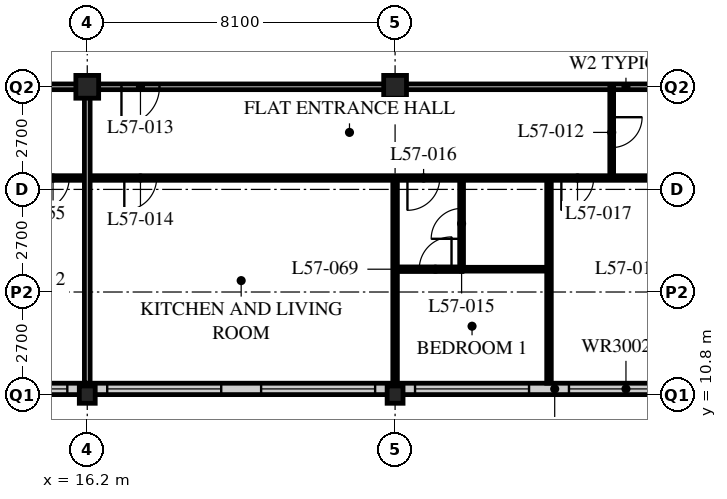
"""IFC4 building model, lengths in metres.
Left out: names, types, materials, properties, quantities, classifications, styles, units other than length and angle.
Written with IfcOpenShell. Run it as: python <this file> out.ifc"""

import sys

from ifc_helpers import new_model, si_unit, direction, frame, frame_2d, origin, origin_2d, place, context, subcontext, project, spatial, rectangle, hollow_rectangle, i_section, extrude, element, fill, save


model = new_model("IFC4")
c1 = context("Model", 3, precision=1e-05, world=origin(), true_north=direction((0.0, 1.0)))
c2 = subcontext(c1, "Body", "Model", "MODEL_VIEW")
j1 = project(units=[si_unit("LENGTHUNIT", "METRE"), si_unit("PLANEANGLEUNIT", "RADIAN")], contexts=[c1])
p1 = place(None, origin())
s1 = spatial("IfcSite", under=j1, at=p1, CompositionType="ELEMENT")
p2 = place(p1, origin())
s2 = spatial("IfcBuilding", under=s1, at=p2, CompositionType="ELEMENT")
p3 = place(p2, frame((0.0, 0.0, 220.8)))
s3 = spatial("IfcBuildingStorey", under=s2, at=p3, CompositionType="ELEMENT", Elevation=220.8)
p4 = place(p3, frame((16.2, 10.8, 0.0), z_axis=(0.0, 0.0, 1.0), x_axis=(1.0, 0.0, 0.0)))
e1 = element("IfcColumn", 1, at=p4, inside=s3, PredefinedType="COLUMN", context=c2, shape_type="SweptSolid", body=[
    extrude(i_section(OverallWidth=0.418, OverallDepth=0.456, WebThickness=0.042, FlangeThickness=0.067, FilletRadius=0.015, at=origin_2d()), origin(), (0.0, 0.0, 1.0), 3.6),
])
p5 = place(p3, frame((16.2, 18.9, 0.0), z_axis=(0.0, 0.0, 1.0), x_axis=(1.0, 0.0, 0.0)))
e2 = element("IfcColumn", 2, at=p5, inside=s3, PredefinedType="COLUMN", context=c2, shape_type="SweptSolid", body=[
    extrude(hollow_rectangle(XDim=0.6, YDim=0.6, WallThickness=0.05, at=origin_2d()), origin(), (0.0, 0.0, 1.0), 3.6),
])
p6 = place(p3, frame((24.3, 10.8, 0.0), z_axis=(0.0, 0.0, 1.0), x_axis=(1.0, 0.0, 0.0)))
e3 = element("IfcColumn", 3, at=p6, inside=s3, PredefinedType="COLUMN", context=c2, shape_type="SweptSolid", body=[
    extrude(i_section(OverallWidth=0.418, OverallDepth=0.456, WebThickness=0.042, FlangeThickness=0.067, FilletRadius=0.015, at=origin_2d()), origin(), (0.0, 0.0, 1.0), 3.6),
])
p7 = place(p3, frame((24.3, 18.9, 0.0), z_axis=(0.0, 0.0, 1.0), x_axis=(1.0, 0.0, 0.0)))
e4 = element("IfcColumn", 4, at=p7, inside=s3, PredefinedType="COLUMN", context=c2, shape_type="SweptSolid", body=[
    extrude(hollow_rectangle(XDim=0.6, YDim=0.6, WallThickness=0.05, at=origin_2d()), origin(), (0.0, 0.0, 1.0), 3.6),
])
p8 = place(p3, frame((8.4, 10.95, 0.0), z_axis=(0.0, 0.0, 1.0), x_axis=(1.0, 0.0, 0.0)))
e5 = element("IfcWall", 5, at=p8, inside=s3, PredefinedType="SOLIDWALL", context=c2, shape_type="SweptSolid", body=[
    extrude(rectangle(XDim=40.2, YDim=0.3, at=frame_2d((20.1, 0.0))), origin(), (0.0, 0.0, 1.0), 3.39),
])
p9 = place(p8, frame((0.225, 0.0, 0.6)))
e6 = element("IfcOpeningElement", 6, at=p9, cuts=e5, PredefinedType="OPENING", context=c2, shape_type="SweptSolid", body=[
    extrude(rectangle(XDim=3.0, YDim=2.0, at=frame_2d((1.5, 1.0))), frame((0.0, 0.16, 0.0), z_axis=(0.0, -1.0, 0.0), x_axis=(1.0, 0.0, 0.0)), (0.0, 0.0, 1.0), 0.32),
])
p10 = place(p8, frame((4.275, 0.0, 0.6)))
e7 = element("IfcOpeningElement", 7, at=p10, cuts=e5, PredefinedType="OPENING", context=c2, shape_type="SweptSolid", body=[
    extrude(rectangle(XDim=3.0, YDim=2.0, at=frame_2d((1.5, 1.0))), frame((0.0, 0.16, 0.0), z_axis=(0.0, -1.0, 0.0), x_axis=(1.0, 0.0, 0.0)), (0.0, 0.0, 1.0), 0.32),
])
p11 = place(p8, frame((8.325, 0.0, 0.6)))
e8 = element("IfcOpeningElement", 8, at=p11, cuts=e5, PredefinedType="OPENING", context=c2, shape_type="SweptSolid", body=[
    extrude(rectangle(XDim=3.0, YDim=2.0, at=frame_2d((1.5, 1.0))), frame((0.0, 0.16, 0.0), z_axis=(0.0, -1.0, 0.0), x_axis=(1.0, 0.0, 0.0)), (0.0, 0.0, 1.0), 0.32),
])
p12 = place(p8, frame((12.375, 0.0, 0.6)))
e9 = element("IfcOpeningElement", 9, at=p12, cuts=e5, PredefinedType="OPENING", context=c2, shape_type="SweptSolid", body=[
    extrude(rectangle(XDim=3.0, YDim=2.0, at=frame_2d((1.5, 1.0))), frame((0.0, 0.16, 0.0), z_axis=(0.0, -1.0, 0.0), x_axis=(1.0, 0.0, 0.0)), (0.0, 0.0, 1.0), 0.32),
])
p13 = place(p8, frame((16.425, 0.0, 0.6)))
e10 = element("IfcOpeningElement", 10, at=p13, cuts=e5, PredefinedType="OPENING", context=c2, shape_type="SweptSolid", body=[
    extrude(rectangle(XDim=3.0, YDim=2.0, at=frame_2d((1.5, 1.0))), frame((0.0, 0.16, 0.0), z_axis=(0.0, -1.0, 0.0), x_axis=(1.0, 0.0, 0.0)), (0.0, 0.0, 1.0), 0.32),
])
p14 = place(p8, frame((20.475, 0.0, 0.6)))
e11 = element("IfcOpeningElement", 11, at=p14, cuts=e5, PredefinedType="OPENING", context=c2, shape_type="SweptSolid", body=[
    extrude(rectangle(XDim=3.0, YDim=2.0, at=frame_2d((1.5, 1.0))), frame((0.0, 0.16, 0.0), z_axis=(0.0, -1.0, 0.0), x_axis=(1.0, 0.0, 0.0)), (0.0, 0.0, 1.0), 0.32),
])
p15 = place(p8, frame((24.525, 0.0, 0.6)))
e12 = element("IfcOpeningElement", 12, at=p15, cuts=e5, PredefinedType="OPENING", context=c2, shape_type="SweptSolid", body=[
    extrude(rectangle(XDim=3.0, YDim=2.0, at=frame_2d((1.5, 1.0))), frame((0.0, 0.16, 0.0), z_axis=(0.0, -1.0, 0.0), x_axis=(1.0, 0.0, 0.0)), (0.0, 0.0, 1.0), 0.32),
])
p16 = place(p8, frame((28.575, 0.0, 0.6)))
e13 = element("IfcOpeningElement", 13, at=p16, cuts=e5, PredefinedType="OPENING", context=c2, shape_type="SweptSolid", body=[
    extrude(rectangle(XDim=3.0, YDim=2.0, at=frame_2d((1.5, 1.0))), frame((0.0, 0.16, 0.0), z_axis=(0.0, -1.0, 0.0), x_axis=(1.0, 0.0, 0.0)), (0.0, 0.0, 1.0), 0.32),
])
p17 = place(p8, frame((32.625, 0.0, 0.6)))
e14 = element("IfcOpeningElement", 14, at=p17, cuts=e5, PredefinedType="OPENING", context=c2, shape_type="SweptSolid", body=[
    extrude(rectangle(XDim=3.0, YDim=2.0, at=frame_2d((1.5, 1.0))), frame((0.0, 0.16, 0.0), z_axis=(0.0, -1.0, 0.0), x_axis=(1.0, 0.0, 0.0)), (0.0, 0.0, 1.0), 0.32),
])
p18 = place(p8, frame((36.675, 0.0, 0.6)))
e15 = element("IfcOpeningElement", 15, at=p18, cuts=e5, PredefinedType="OPENING", context=c2, shape_type="SweptSolid", body=[
    extrude(rectangle(XDim=3.0, YDim=2.0, at=frame_2d((1.5, 1.0))), frame((0.0, 0.16, 0.0), z_axis=(0.0, -1.0, 0.0), x_axis=(1.0, 0.0, 0.0)), (0.0, 0.0, 1.0), 0.32),
])
p19 = place(p3, frame((12.15, 18.9, 0.0), z_axis=(0.0, 0.0, 1.0), x_axis=(1.0, 0.0, 0.0)))
e16 = element("IfcWall", 16, at=p19, inside=s3, PredefinedType="PARTITIONING", context=c2, shape_type="SweptSolid", body=[
    extrude(rectangle(XDim=36.45, YDim=0.15, at=frame_2d((18.225, 0.0))), origin(), (0.0, 0.0, 1.0), 2.628),
])
p20 = place(p19, frame((4.95, 0.0, 0.0)))
e17 = element("IfcOpeningElement", 17, at=p20, cuts=e16, PredefinedType="OPENING", context=c2, shape_type="SweptSolid", body=[
    extrude(rectangle(XDim=1.0, YDim=2.1, at=frame_2d((0.5, 1.05))), frame((0.0, 0.085, 0.0), z_axis=(0.0, -1.0, 0.0), x_axis=(1.0, 0.0, 0.0)), (0.0, 0.0, 1.0), 0.17),
])
p21 = place(p19, frame((22.6, 0.0, 0.0)))
e18 = element("IfcOpeningElement", 18, at=p21, cuts=e16, PredefinedType="OPENING", context=c2, shape_type="SweptSolid", body=[
    extrude(rectangle(XDim=1.0, YDim=2.1, at=frame_2d((0.5, 1.05))), frame((0.0, 0.085, 0.0), z_axis=(0.0, -1.0, 0.0), x_axis=(1.0, 0.0, 0.0)), (0.0, 0.0, 1.0), 0.17),
])
p22 = place(p19, frame((25.0, 0.0, 0.0)))
e19 = element("IfcOpeningElement", 19, at=p22, cuts=e16, PredefinedType="OPENING", context=c2, shape_type="SweptSolid", body=[
    extrude(rectangle(XDim=1.0, YDim=2.1, at=frame_2d((0.5, 1.05))), frame((0.0, 0.085, 0.0), z_axis=(0.0, -1.0, 0.0), x_axis=(1.0, 0.0, 0.0)), (0.0, 0.0, 1.0), 0.17),
])
p23 = place(p19, frame((30.7, 0.0, 0.0)))
e20 = element("IfcOpeningElement", 20, at=p23, cuts=e16, PredefinedType="OPENING", context=c2, shape_type="SweptSolid", body=[
    extrude(rectangle(XDim=1.0, YDim=2.1, at=frame_2d((0.5, 1.05))), frame((0.0, 0.085, 0.0), z_axis=(0.0, -1.0, 0.0), x_axis=(1.0, 0.0, 0.0)), (0.0, 0.0, 1.0), 0.17),
])
p24 = place(p19, frame((1.525, 0.0, 0.0)))
e21 = element("IfcOpeningElement", 21, at=p24, cuts=e16, PredefinedType="OPENING", context=c2, shape_type="SweptSolid", body=[
    extrude(rectangle(XDim=1.0, YDim=2.1, at=frame_2d((0.5, 1.05))), frame((0.0, 0.085, 0.0), z_axis=(0.0, -1.0, 0.0), x_axis=(1.0, 0.0, 0.0)), (0.0, 0.0, 1.0), 0.17),
])
p25 = place(p19, frame((32.825, 0.0, 0.0)))
e22 = element("IfcOpeningElement", 22, at=p25, cuts=e16, PredefinedType="OPENING", context=c2, shape_type="SweptSolid", body=[
    extrude(rectangle(XDim=1.0, YDim=2.1, at=frame_2d((0.5, 1.05))), frame((0.0, 0.085, 0.0), z_axis=(0.0, -1.0, 0.0), x_axis=(1.0, 0.0, 0.0)), (0.0, 0.0, 1.0), 0.17),
])
p26 = place(p3, frame((30.0, 18.9, 0.0), z_axis=(0.0, 0.0, 1.0), x_axis=(0.0, -1.0, 0.0)))
e23 = element("IfcWall", 23, at=p26, inside=s3, PredefinedType="PARTITIONING", context=c2, shape_type="SweptSolid", body=[
    extrude(rectangle(XDim=2.4, YDim=0.1, at=frame_2d((1.2, 0.0))), origin(), (0.0, 0.0, 1.0), 3.39),
])
p27 = place(p26, frame((0.8, 0.0, 0.0)))
e24 = element("IfcOpeningElement", 24, at=p27, cuts=e23, PredefinedType="OPENING", context=c2, shape_type="SweptSolid", body=[
    extrude(rectangle(XDim=0.8, YDim=2.1, at=frame_2d((0.4, 1.05))), frame((0.0, 0.06, 0.0), z_axis=(0.0, -1.0, 0.0), x_axis=(1.0, 0.0, 0.0)), (0.0, 0.0, 1.0), 0.12),
])
p28 = place(p3, frame((26.05, 16.5, 0.0), z_axis=(0.0, 0.0, 1.0), x_axis=(0.0, -1.0, 0.0)))
e25 = element("IfcWall", 25, at=p28, inside=s3, PredefinedType="PARTITIONING", context=c2, shape_type="SweptSolid", body=[
    extrude(rectangle(XDim=2.4, YDim=0.1, at=frame_2d((1.2, 0.0))), origin(), (0.0, 0.0, 1.0), 3.39),
])
p29 = place(p28, frame((0.8, 0.0, 0.0)))
e26 = element("IfcOpeningElement", 26, at=p29, cuts=e25, PredefinedType="OPENING", context=c2, shape_type="SweptSolid", body=[
    extrude(rectangle(XDim=0.8, YDim=2.1, at=frame_2d((0.4, 1.05))), frame((0.0, 0.06, 0.0), z_axis=(0.0, -1.0, 0.0), x_axis=(1.0, 0.0, 0.0)), (0.0, 0.0, 1.0), 0.12),
])
p30 = place(p3, frame((26.05, 14.1, 0.0), z_axis=(0.0, 0.0, 1.0), x_axis=(1.0, 0.0, 0.0)))
e27 = element("IfcWall", 27, at=p30, inside=s3, PredefinedType="PARTITIONING", context=c2, shape_type="SweptSolid", body=[
    extrude(rectangle(XDim=2.3, YDim=0.1, at=frame_2d((1.15, 0.0))), origin(), (0.0, 0.0, 1.0), 3.39),
])
p31 = place(p3, frame((24.3, 16.5, 0.0), z_axis=(0.0, 0.0, 1.0), x_axis=(0.0, -1.0, 0.0)))
e28 = element("IfcWall", 28, at=p31, inside=s3, PredefinedType="PARTITIONING", context=c2, shape_type="SweptSolid", body=[
    extrude(rectangle(XDim=5.4, YDim=0.12, at=frame_2d((2.7, 0.0))), origin(), (0.0, 0.0, 1.0), 2.628),
])
p32 = place(p3, frame((28.35, 16.5, 0.0), z_axis=(0.0, 0.0, 1.0), x_axis=(0.0, -1.0, 0.0)))
e29 = element("IfcWall", 29, at=p32, inside=s3, PredefinedType="PARTITIONING", context=c2, shape_type="SweptSolid", body=[
    extrude(rectangle(XDim=5.4, YDim=0.12, at=frame_2d((2.7, 0.0))), origin(), (0.0, 0.0, 1.0), 3.39),
])
p33 = place(p3, frame((8.15, 16.5, 0.0), z_axis=(0.0, 0.0, 1.0), x_axis=(1.0, 0.0, 0.0)))
e30 = element("IfcWall", 30, at=p33, inside=s3, PredefinedType="PARTITIONING", context=c2, shape_type="SweptSolid", body=[
    extrude(rectangle(XDim=24.25, YDim=0.12, at=frame_2d((12.125, 0.0))), origin(), (0.0, 0.0, 1.0), 3.39),
])
p34 = place(p33, frame((9.025, 0.0, 0.0)))
e31 = element("IfcOpeningElement", 31, at=p34, cuts=e30, PredefinedType="OPENING", context=c2, shape_type="SweptSolid", body=[
    extrude(rectangle(XDim=0.85, YDim=2.1, at=frame_2d((0.425, 1.05))), frame((0.0, 0.07, 0.0), z_axis=(0.0, -1.0, 0.0), x_axis=(1.0, 0.0, 0.0)), (0.0, 0.0, 1.0), 0.14),
])
p35 = place(p33, frame((16.475, 0.0, 0.0)))
e32 = element("IfcOpeningElement", 32, at=p35, cuts=e30, PredefinedType="OPENING", context=c2, shape_type="SweptSolid", body=[
    extrude(rectangle(XDim=0.85, YDim=2.1, at=frame_2d((0.425, 1.05))), frame((0.0, 0.07, 0.0), z_axis=(0.0, -1.0, 0.0), x_axis=(1.0, 0.0, 0.0)), (0.0, 0.0, 1.0), 0.14),
])
p36 = place(p33, frame((20.525, 0.0, 0.0)))
e33 = element("IfcOpeningElement", 33, at=p36, cuts=e30, PredefinedType="OPENING", context=c2, shape_type="SweptSolid", body=[
    extrude(rectangle(XDim=0.85, YDim=2.1, at=frame_2d((0.425, 1.05))), frame((0.0, 0.07, 0.0), z_axis=(0.0, -1.0, 0.0), x_axis=(1.0, 0.0, 0.0)), (0.0, 0.0, 1.0), 0.14),
])
p37 = place(p33, frame((6.725, 0.0, 0.0)))
e34 = element("IfcOpeningElement", 34, at=p37, cuts=e30, PredefinedType="OPENING", context=c2, shape_type="SweptSolid", body=[
    extrude(rectangle(XDim=0.85, YDim=2.1, at=frame_2d((0.425, 1.05))), frame((0.0, 0.07, 0.0), z_axis=(0.0, -1.0, 0.0), x_axis=(1.0, 0.0, 0.0)), (0.0, 0.0, 1.0), 0.14),
])
p38 = place(p33, frame((2.875, 0.0, 0.0)))
e35 = element("IfcOpeningElement", 35, at=p38, cuts=e30, PredefinedType="OPENING", context=c2, shape_type="SweptSolid", body=[
    extrude(rectangle(XDim=0.85, YDim=2.1, at=frame_2d((0.425, 1.05))), frame((0.0, 0.07, 0.0), z_axis=(0.0, -1.0, 0.0), x_axis=(1.0, 0.0, 0.0)), (0.0, 0.0, 1.0), 0.14),
])
p39 = place(p3, frame((16.2, 18.9, 0.0), z_axis=(0.0, 0.0, 1.0), x_axis=(0.0, -1.0, 0.0)))
e36 = element("IfcWall", 36, at=p39, inside=s3, PredefinedType="PARTITIONING", context=c2, shape_type="SweptSolid", body=[
    extrude(rectangle(XDim=7.8, YDim=0.15, at=frame_2d((3.9, 0.0))), origin(), (0.0, 0.0, 1.0), 2.628),
])
p40 = place(p3, frame((26.06, 14.1, 0.0), z_axis=(0.0, 0.0, 1.0), x_axis=(-1.0, 0.0, 0.0)))
e37 = element("IfcWall", 37, at=p40, inside=s3, PredefinedType="PARTITIONING", context=c2, shape_type="SweptSolid", body=[
    extrude(rectangle(XDim=1.76, YDim=0.12, at=frame_2d((0.88, 0.0))), origin(), (0.0, 0.0, 1.0), 3.39),
])
p41 = place(p40, frame((0.275, 0.0, 0.0)))
e38 = element("IfcOpeningElement", 38, at=p41, cuts=e37, PredefinedType="OPENING", context=c2, shape_type="SweptSolid", body=[
    extrude(rectangle(XDim=0.85, YDim=2.1, at=frame_2d((0.425, 1.05))), frame((0.0, 0.07, 0.0), z_axis=(0.0, -1.0, 0.0), x_axis=(1.0, 0.0, 0.0)), (0.0, 0.0, 1.0), 0.14),
])
p42 = place(p10, origin())
e39 = element("IfcWindow", 39, at=p42, inside=s3, PartitioningType="SINGLE_PANEL", PredefinedType="WINDOW", context=c2, shape_type="SweptSolid", body=[
    extrude(rectangle(XDim=3.0, YDim=2.0, at=frame_2d((1.5, 1.0))), frame((0.0, 0.03, 0.0), z_axis=(0.0, -1.0, 0.0), x_axis=(1.0, 0.0, 0.0)), (0.0, 0.0, 1.0), 0.06),
])
fill(e7, e39)
p43 = place(p11, origin())
e40 = element("IfcWindow", 40, at=p43, inside=s3, PartitioningType="SINGLE_PANEL", PredefinedType="WINDOW", context=c2, shape_type="SweptSolid", body=[
    extrude(rectangle(XDim=3.0, YDim=2.0, at=frame_2d((1.5, 1.0))), frame((0.0, 0.03, 0.0), z_axis=(0.0, -1.0, 0.0), x_axis=(1.0, 0.0, 0.0)), (0.0, 0.0, 1.0), 0.06),
])
fill(e8, e40)
p44 = place(p12, origin())
e41 = element("IfcWindow", 41, at=p44, inside=s3, PartitioningType="SINGLE_PANEL", PredefinedType="WINDOW", context=c2, shape_type="SweptSolid", body=[
    extrude(rectangle(XDim=3.0, YDim=2.0, at=frame_2d((1.5, 1.0))), frame((0.0, 0.03, 0.0), z_axis=(0.0, -1.0, 0.0), x_axis=(1.0, 0.0, 0.0)), (0.0, 0.0, 1.0), 0.06),
])
fill(e9, e41)
p45 = place(p13, origin())
e42 = element("IfcWindow", 42, at=p45, inside=s3, PartitioningType="SINGLE_PANEL", PredefinedType="WINDOW", context=c2, shape_type="SweptSolid", body=[
    extrude(rectangle(XDim=3.0, YDim=2.0, at=frame_2d((1.5, 1.0))), frame((0.0, 0.03, 0.0), z_axis=(0.0, -1.0, 0.0), x_axis=(1.0, 0.0, 0.0)), (0.0, 0.0, 1.0), 0.06),
])
fill(e10, e42)
p46 = place(p14, origin())
e43 = element("IfcWindow", 43, at=p46, inside=s3, PartitioningType="SINGLE_PANEL", PredefinedType="WINDOW", context=c2, shape_type="SweptSolid", body=[
    extrude(rectangle(XDim=3.0, YDim=2.0, at=frame_2d((1.5, 1.0))), frame((0.0, 0.03, 0.0), z_axis=(0.0, -1.0, 0.0), x_axis=(1.0, 0.0, 0.0)), (0.0, 0.0, 1.0), 0.06),
])
fill(e11, e43)
p47 = place(p27, origin())
e44 = element("IfcDoor", 44, at=p47, inside=s3, OperationType="SINGLE_SWING_LEFT", PredefinedType="DOOR", context=c2, shape_type="SweptSolid", body=[
    extrude(rectangle(XDim=0.8, YDim=2.1, at=frame_2d((0.4, 1.05))), frame((0.0, 0.025, 0.0), z_axis=(0.0, -1.0, 0.0), x_axis=(1.0, 0.0, 0.0)), (0.0, 0.0, 1.0), 0.05),
])
fill(e24, e44)
p48 = place(p20, origin())
e45 = element("IfcDoor", 45, at=p48, inside=s3, OperationType="SINGLE_SWING_RIGHT", PredefinedType="DOOR", context=c2, shape_type="SweptSolid", body=[
    extrude(rectangle(XDim=1.0, YDim=2.1, at=frame_2d((0.5, 1.05))), frame((0.0, 0.025, 0.0), z_axis=(0.0, -1.0, 0.0), x_axis=(1.0, 0.0, 0.0)), (0.0, 0.0, 1.0), 0.05),
])
fill(e17, e45)
p49 = place(p34, origin())
e46 = element("IfcDoor", 46, at=p49, inside=s3, OperationType="SINGLE_SWING_RIGHT", PredefinedType="DOOR", context=c2, shape_type="SweptSolid", body=[
    extrude(rectangle(XDim=0.85, YDim=2.1, at=frame_2d((0.425, 1.05))), frame((0.0, 0.025, 0.0), z_axis=(0.0, -1.0, 0.0), x_axis=(1.0, 0.0, 0.0)), (0.0, 0.0, 1.0), 0.05),
])
fill(e31, e46)
p50 = place(p29, origin())
e47 = element("IfcDoor", 47, at=p50, inside=s3, OperationType="SINGLE_SWING_LEFT", PredefinedType="DOOR", context=c2, shape_type="SweptSolid", body=[
    extrude(rectangle(XDim=0.8, YDim=2.1, at=frame_2d((0.4, 1.05))), frame((0.0, 0.025, 0.0), z_axis=(0.0, -1.0, 0.0), x_axis=(1.0, 0.0, 0.0)), (0.0, 0.0, 1.0), 0.05),
])
fill(e26, e47)
p51 = place(p35, origin())
e48 = element("IfcDoor", 48, at=p51, inside=s3, OperationType="SINGLE_SWING_RIGHT", PredefinedType="DOOR", context=c2, shape_type="SweptSolid", body=[
    extrude(rectangle(XDim=0.85, YDim=2.1, at=frame_2d((0.425, 1.05))), frame((0.0, 0.025, 0.0), z_axis=(0.0, -1.0, 0.0), x_axis=(1.0, 0.0, 0.0)), (0.0, 0.0, 1.0), 0.05),
])
fill(e32, e48)
p52 = place(p36, origin())
e49 = element("IfcDoor", 49, at=p52, inside=s3, OperationType="SINGLE_SWING_RIGHT", PredefinedType="DOOR", context=c2, shape_type="SweptSolid", body=[
    extrude(rectangle(XDim=0.85, YDim=2.1, at=frame_2d((0.425, 1.05))), frame((0.0, 0.025, 0.0), z_axis=(0.0, -1.0, 0.0), x_axis=(1.0, 0.0, 0.0)), (0.0, 0.0, 1.0), 0.05),
])
fill(e33, e49)
p53 = place(p37, origin())
e50 = element("IfcDoor", 50, at=p53, inside=s3, OperationType="SINGLE_SWING_RIGHT", PredefinedType="DOOR", context=c2, shape_type="SweptSolid", body=[
    extrude(rectangle(XDim=0.85, YDim=2.1, at=frame_2d((0.425, 1.05))), frame((0.0, 0.025, 0.0), z_axis=(0.0, -1.0, 0.0), x_axis=(1.0, 0.0, 0.0)), (0.0, 0.0, 1.0), 0.05),
])
fill(e34, e50)
p54 = place(p41, origin())
e51 = element("IfcDoor", 51, at=p54, inside=s3, OperationType="SINGLE_SWING_RIGHT", PredefinedType="DOOR", context=c2, shape_type="SweptSolid", body=[
    extrude(rectangle(XDim=0.85, YDim=2.1, at=frame_2d((0.425, 1.05))), frame((0.0, 0.025, 0.0), z_axis=(0.0, -1.0, 0.0), x_axis=(1.0, 0.0, 0.0)), (0.0, 0.0, 1.0), 0.05),
])
fill(e38, e51)
save(model, sys.argv[1])
